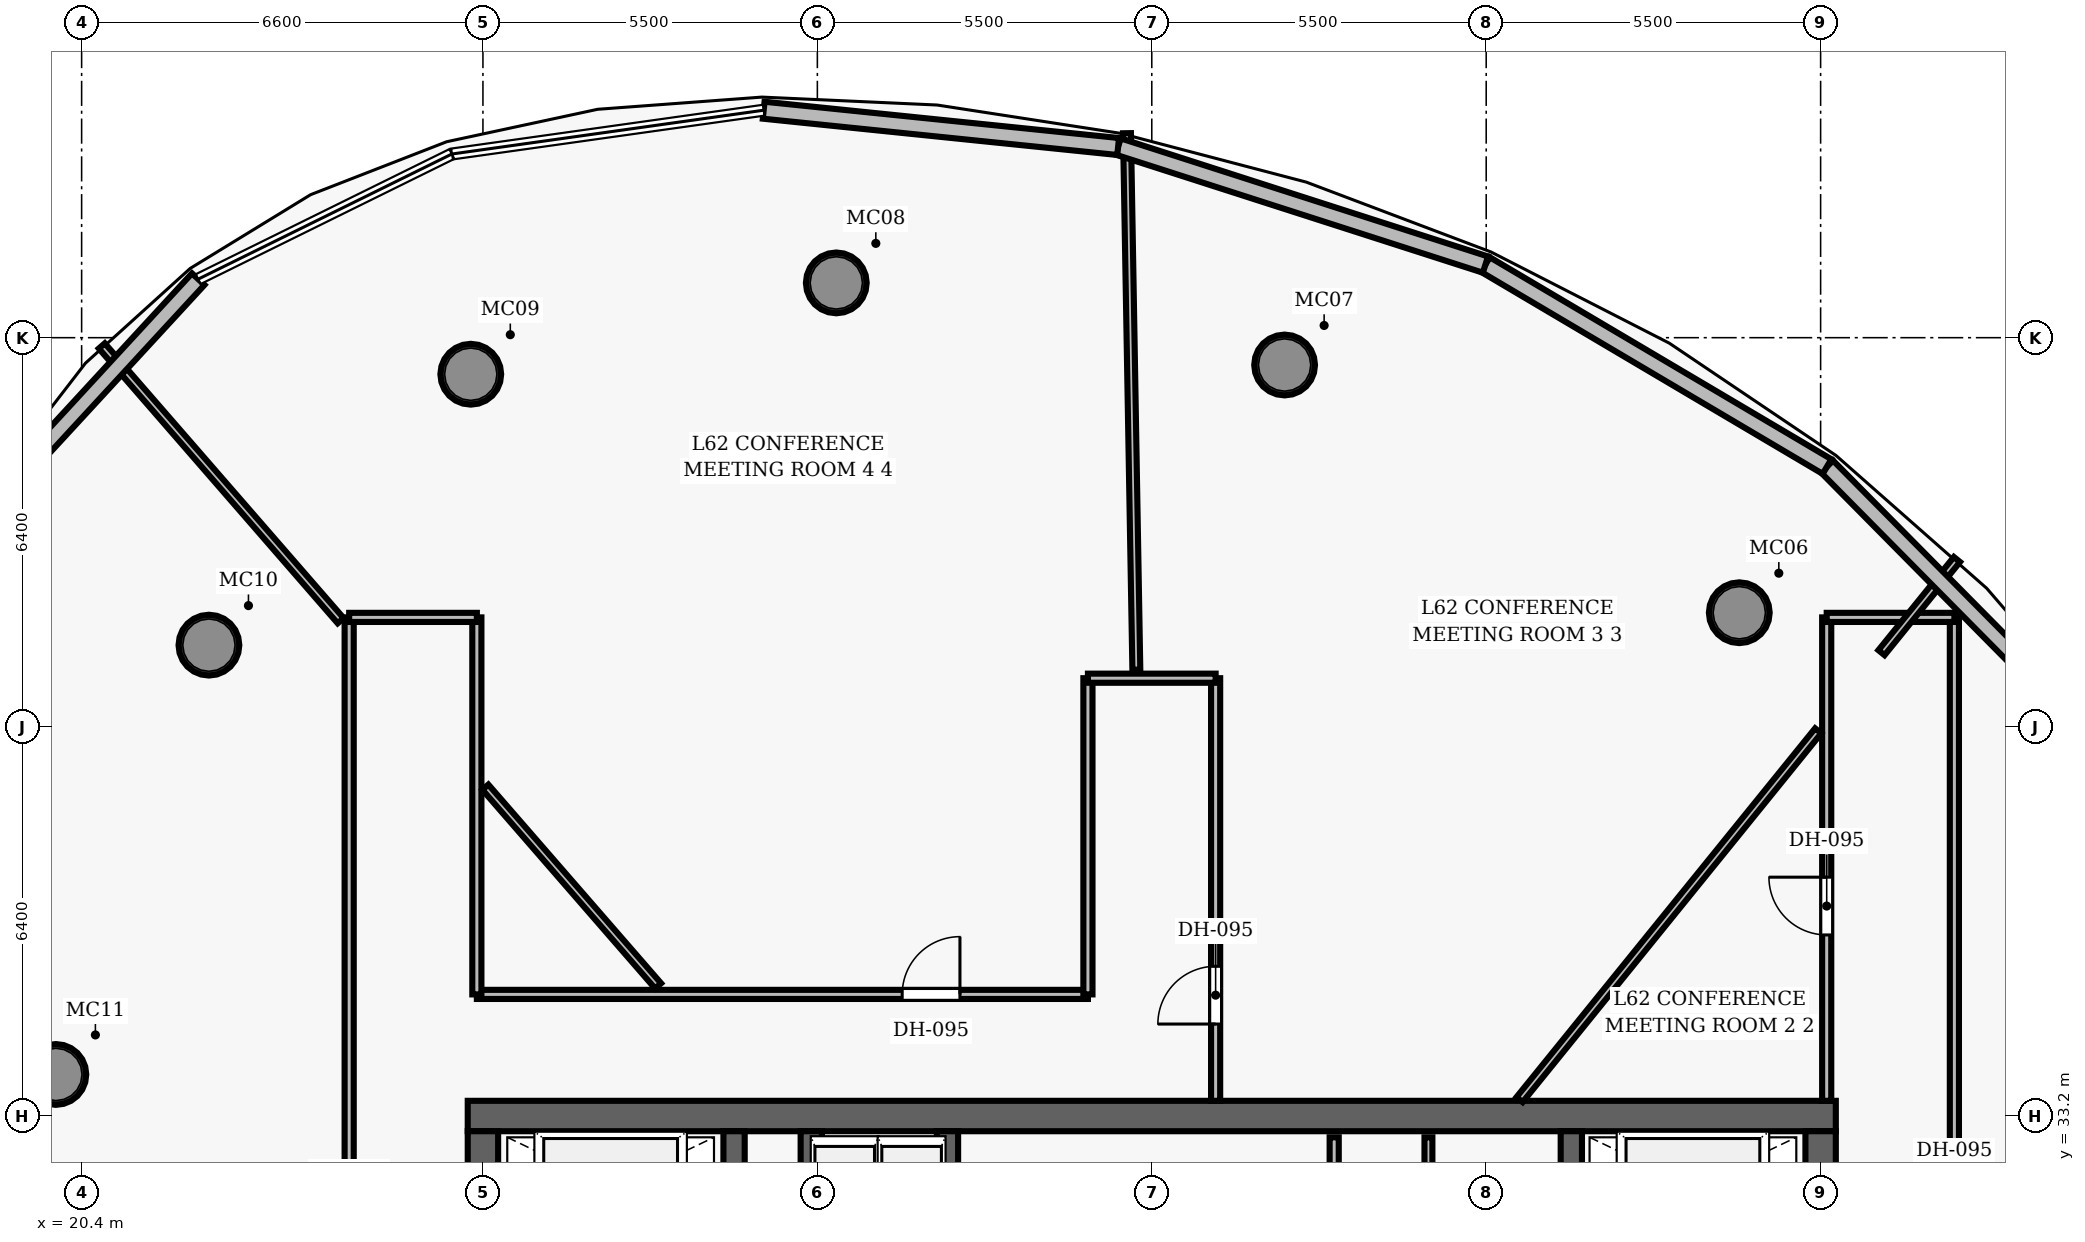
"""IFC4 building model, lengths in metres.
Left out: names, types, materials, properties, quantities, classifications, styles, units other than length and angle.
Written with IfcOpenShell. Run it as: python <this file> out.ifc"""

import sys

from ifc_helpers import new_model, si_unit, direction, frame, frame_2d, origin, origin_2d, place, context, subcontext, project, spatial, rectangle, hollow_circle, extrude, element, fill, save


model = new_model("IFC4")
c1 = context("Model", 3, precision=1e-05, world=origin(), true_north=direction((0.0, 1.0)))
c2 = subcontext(c1, "Body", "Model", "MODEL_VIEW")
j1 = project(units=[si_unit("LENGTHUNIT", "METRE"), si_unit("PLANEANGLEUNIT", "RADIAN")], contexts=[c1])
p1 = place(None, origin())
s1 = spatial("IfcSite", under=j1, at=p1, CompositionType="ELEMENT")
p2 = place(p1, origin())
s2 = spatial("IfcBuilding", under=s1, at=p2, CompositionType="ELEMENT")
p3 = place(p2, frame((0.0, 0.0, 245.9)))
s3 = spatial("IfcBuildingStorey", under=s2, at=p3, CompositionType="ELEMENT", Elevation=245.9)
p4 = place(p3, frame((26.75, 33.2, 0.0), z_axis=(0.0, 0.0, 1.0), x_axis=(1.0, 0.0, 0.0)))
e1 = element("IfcWall", 1, at=p4, inside=s3, PredefinedType="SHEAR", context=c2, shape_type="SweptSolid", body=[
    extrude(rectangle(XDim=22.5, YDim=0.5, at=frame_2d((11.25, 0.0))), origin(), (0.0, 0.0, 1.0), 3.85),
])
p5 = place(p3, frame((27.0, 19.05, 0.0), z_axis=(0.0, 0.0, 1.0), x_axis=(0.0, 1.0, 0.0)))
e2 = element("IfcWall", 2, at=p5, inside=s3, PredefinedType="SHEAR", context=c2, shape_type="SweptSolid", body=[
    extrude(rectangle(XDim=13.9, YDim=0.5, at=frame_2d((6.95, 0.0))), origin(), (0.0, 0.0, 1.0), 3.85),
])
p6 = place(p5, frame((8.2, 0.0, 0.0)))
e3 = element("IfcOpeningElement", 3, at=p6, cuts=e2, PredefinedType="OPENING", context=c2, shape_type="SweptSolid", body=[
    extrude(rectangle(XDim=1.05, YDim=2.15, at=frame_2d((0.525, 1.075))), frame((0.0, 0.26, 0.0), z_axis=(0.0, -1.0, 0.0), x_axis=(1.0, 0.0, 0.0)), (0.0, 0.0, 1.0), 0.52),
])
p7 = place(p3, frame((49.0, 19.05, 0.0), z_axis=(0.0, 0.0, 1.0), x_axis=(0.0, 1.0, 0.0)))
e4 = element("IfcWall", 4, at=p7, inside=s3, PredefinedType="SHEAR", context=c2, shape_type="SweptSolid", body=[
    extrude(rectangle(XDim=13.9, YDim=0.5, at=frame_2d((6.95, 0.0))), origin(), (0.0, 0.0, 1.0), 3.85),
])
p8 = place(p7, frame((8.2, 0.0, 0.0)))
e5 = element("IfcOpeningElement", 5, at=p8, cuts=e4, PredefinedType="OPENING", context=c2, shape_type="SweptSolid", body=[
    extrude(rectangle(XDim=1.05, YDim=2.15, at=frame_2d((0.525, 1.075))), frame((0.0, 0.26, 0.0), z_axis=(0.0, -1.0, 0.0), x_axis=(1.0, 0.0, 0.0)), (0.0, 0.0, 1.0), 0.52),
])
for number, where, z_axis, x_axis in (
    (6, (31.13, 19.05, 0.0), (0.0, 0.0, 1.0), (0.0, 1.0, 0.0)),
    (7, (44.9, 19.05, 0.0), (0.0, 0.0, 1.0), (0.0, 1.0, 0.0)),
):
    element("IfcWall", number, at=place(p3, frame(where, z_axis=z_axis, x_axis=x_axis)), inside=s3, PredefinedType="SHEAR", context=c2, shape_type="SweptSolid", body=[
        extrude(rectangle(XDim=13.9, YDim=0.35, at=frame_2d((6.95, 0.0))), origin(), (0.0, 0.0, 1.0), 3.85),
    ])
for number, where, z_axis, x_axis in (
    (8, (47.662, 41.477, 0.0), (0.0, 0.0, 1.0), (1.0, 0.0, 0.0)),
    (9, (40.185, 45.551, 0.0), (0.0, 0.0, 1.0), (1.0, 0.0, 0.0)),
    (10, (32.812, 46.901, 0.0), (0.0, 0.0, 1.0), (1.0, 0.0, 0.0)),
    (11, (26.8, 45.399, 0.0), (0.0, 0.0, 1.0), (1.0, 0.0, 0.0)),
    (12, (22.494, 40.944, 0.0), (0.0, 0.0, 1.0), (1.0, 0.0, 0.0)),
    (13, (19.976, 33.884, 0.0), (0.0, 0.0, 1.0), (1.0, 0.0, 0.0)),
):
    element("IfcColumn", number, at=place(p3, frame(where, z_axis=z_axis, x_axis=x_axis)), inside=s3, PredefinedType="COLUMN", context=c2, shape_type="SweptSolid", body=[
        extrude(hollow_circle(Radius=0.5, WallThickness=0.045, at=origin_2d()), origin(), (0.0, 0.0, 1.0), 3.85),
    ])
p9 = place(p3, frame((34.64, 26.69, 0.0), z_axis=(0.0, 0.0, 1.0), x_axis=(0.0, 1.0, 0.0)))
e14 = element("IfcWall", 14, at=p9, inside=s3, PredefinedType="SHEAR", context=c2, shape_type="SweptSolid", body=[
    extrude(rectangle(XDim=6.26, YDim=0.35, at=frame_2d((3.13, 0.0))), origin(), (0.0, 0.0, 1.0), 3.85),
])
p10 = place(p9, frame((0.85, 0.0, 0.0)))
e15 = element("IfcOpeningElement", 15, at=p10, cuts=e14, PredefinedType="OPENING", context=c2, shape_type="SweptSolid", body=[
    extrude(rectangle(XDim=1.05, YDim=2.15, at=frame_2d((0.525, 1.075))), frame((0.0, 0.185, 0.0), z_axis=(0.0, -1.0, 0.0), x_axis=(1.0, 0.0, 0.0)), (0.0, 0.0, 1.0), 0.37),
])
p11 = place(p3, frame((32.4, 30.22, 0.0), z_axis=(0.0, 0.0, 1.0), x_axis=(0.0, 1.0, 0.0)))
e16 = element("IfcWall", 16, at=p11, inside=s3, PredefinedType="SHEAR", context=c2, shape_type="SweptSolid", body=[
    extrude(rectangle(XDim=2.73, YDim=0.35, at=frame_2d((1.365, 0.0))), origin(), (0.0, 0.0, 1.0), 3.04),
])
p12 = place(p3, frame((41.0, 28.95, 0.0), z_axis=(0.0, 0.0, 1.0), x_axis=(0.0, 1.0, 0.0)))
e17 = element("IfcWall", 17, at=p12, inside=s3, PredefinedType="PARTITIONING", context=c2, shape_type="SweptSolid", body=[
    extrude(rectangle(XDim=3.9, YDim=0.15, at=frame_2d((1.95, 0.0))), origin(), (0.0, 0.0, 1.0), 3.04),
])
p13 = place(p12, frame((0.7, 0.0, 0.0)))
e18 = element("IfcOpeningElement", 18, at=p13, cuts=e17, PredefinedType="OPENING", context=c2, shape_type="SweptSolid", body=[
    extrude(rectangle(XDim=0.85, YDim=2.1, at=frame_2d((0.425, 1.05))), frame((0.0, 0.085, 0.0), z_axis=(0.0, -1.0, 0.0), x_axis=(1.0, 0.0, 0.0)), (0.0, 0.0, 1.0), 0.17),
])
p14 = place(p3, frame((42.55, 28.1, 0.0), z_axis=(0.0, 0.0, 1.0), x_axis=(0.0, 1.0, 0.0)))
e19 = element("IfcWall", 19, at=p14, inside=s3, PredefinedType="PARTITIONING", context=c2, shape_type="SweptSolid", body=[
    extrude(rectangle(XDim=4.75, YDim=0.13, at=frame_2d((2.375, 0.0))), origin(), (0.0, 0.0, 1.0), 3.04),
])
p15 = place(p14, frame((0.55, 0.0, 0.0)))
e20 = element("IfcOpeningElement", 20, at=p15, cuts=e19, PredefinedType="OPENING", context=c2, shape_type="SweptSolid", body=[
    extrude(rectangle(XDim=0.85, YDim=2.1, at=frame_2d((0.425, 1.05))), frame((0.0, 0.075, 0.0), z_axis=(0.0, -1.0, 0.0), x_axis=(1.0, 0.0, 0.0)), (0.0, 0.0, 1.0), 0.15),
])
p16 = place(p14, frame((2.9, 0.0, 0.0)))
e21 = element("IfcOpeningElement", 21, at=p16, cuts=e19, PredefinedType="OPENING", context=c2, shape_type="SweptSolid", body=[
    extrude(rectangle(XDim=0.85, YDim=2.1, at=frame_2d((0.425, 1.05))), frame((0.0, 0.075, 0.0), z_axis=(0.0, -1.0, 0.0), x_axis=(1.0, 0.0, 0.0)), (0.0, 0.0, 1.0), 0.15),
])
p17 = place(p3, frame((26.9, 35.2, 0.0), z_axis=(0.0, 0.0, 1.0), x_axis=(1.0, 0.0, 0.0)))
e22 = element("IfcWall", 22, at=p17, inside=s3, PredefinedType="PARTITIONING", context=c2, shape_type="SweptSolid", body=[
    extrude(rectangle(XDim=10.05, YDim=0.15, at=frame_2d((5.025, 0.0))), origin(), (0.0, 0.0, 1.0), 3.04),
])
p18 = place(p17, frame((6.995, 0.0, 0.0)))
e23 = element("IfcOpeningElement", 23, at=p18, cuts=e22, PredefinedType="OPENING", context=c2, shape_type="SweptSolid", body=[
    extrude(rectangle(XDim=0.95, YDim=2.15, at=frame_2d((0.475, 1.075))), frame((0.0, 0.085, 0.0), z_axis=(0.0, -1.0, 0.0), x_axis=(1.0, 0.0, 0.0)), (0.0, 0.0, 1.0), 0.17),
])
p19 = place(p3, frame((24.8, 11.29, 0.0), z_axis=(0.0, 0.0, 1.0), x_axis=(0.0, 1.0, 0.0)))
e24 = element("IfcWall", 24, at=p19, inside=s3, PredefinedType="PARTITIONING", context=c2, shape_type="SweptSolid", body=[
    extrude(rectangle(XDim=30.11, YDim=0.15, at=frame_2d((15.055, 0.0))), origin(), (0.0, 0.0, 1.0), 3.04),
])
p20 = place(p19, frame((19.445, 0.0, 0.0)))
e25 = element("IfcOpeningElement", 25, at=p20, cuts=e24, PredefinedType="OPENING", context=c2, shape_type="SweptSolid", body=[
    extrude(rectangle(XDim=0.95, YDim=2.15, at=frame_2d((0.475, 1.075))), frame((0.0, 0.085, 0.0), z_axis=(0.0, -1.0, 0.0), x_axis=(1.0, 0.0, 0.0)), (0.0, 0.0, 1.0), 0.17),
])
p21 = place(p19, frame((11.011, 0.0, 0.0)))
e26 = element("IfcOpeningElement", 26, at=p21, cuts=e24, PredefinedType="OPENING", context=c2, shape_type="SweptSolid", body=[
    extrude(rectangle(XDim=1.5, YDim=2.2, at=frame_2d((0.75, 1.1))), frame((0.0, 0.085, 0.0), z_axis=(0.0, -1.0, 0.0), x_axis=(1.0, 0.0, 0.0)), (0.0, 0.0, 1.0), 0.17),
])
p22 = place(p3, frame((26.9, 35.2, 0.0), z_axis=(0.0, 0.0, 1.0), x_axis=(0.0, 1.0, 0.0)))
e27 = element("IfcWall", 27, at=p22, inside=s3, PredefinedType="PARTITIONING", context=c2, shape_type="SweptSolid", body=[
    extrude(rectangle(XDim=6.2, YDim=0.15, at=frame_2d((3.1, 0.0))), origin(), (0.0, 0.0, 1.0), 3.04),
])
p23 = place(p3, frame((24.8, 41.4, 0.0), z_axis=(0.0, 0.0, 1.0), x_axis=(1.0, 0.0, 0.0)))
e28 = element("IfcWall", 28, at=p23, inside=s3, PredefinedType="PARTITIONING", context=c2, shape_type="SweptSolid", body=[
    extrude(rectangle(XDim=2.1, YDim=0.15, at=frame_2d((1.05, 0.0))), origin(), (0.0, 0.0, 1.0), 3.04),
])
p24 = place(p3, frame((51.2, 10.6, 0.0), z_axis=(0.0, 0.0, 1.0), x_axis=(0.0, 1.0, 0.0)))
e29 = element("IfcWall", 29, at=p24, inside=s3, PredefinedType="PARTITIONING", context=c2, shape_type="SweptSolid", body=[
    extrude(rectangle(XDim=30.8, YDim=0.15, at=frame_2d((15.4, 0.0))), origin(), (0.0, 0.0, 1.0), 3.04),
])
p25 = place(p24, frame((20.494, 0.0, 0.0)))
e30 = element("IfcOpeningElement", 30, at=p25, cuts=e29, PredefinedType="OPENING", context=c2, shape_type="SweptSolid", body=[
    extrude(rectangle(XDim=0.95, YDim=2.15, at=frame_2d((0.475, 1.075))), frame((0.0, 0.085, 0.0), z_axis=(0.0, -1.0, 0.0), x_axis=(1.0, 0.0, 0.0)), (0.0, 0.0, 1.0), 0.17),
])
p26 = place(p24, frame((10.941, 0.0, 0.0)))
e31 = element("IfcOpeningElement", 31, at=p26, cuts=e29, PredefinedType="OPENING", context=c2, shape_type="SweptSolid", body=[
    extrude(rectangle(XDim=0.95, YDim=2.15, at=frame_2d((0.475, 1.075))), frame((0.0, 0.085, 0.0), z_axis=(0.0, -1.0, 0.0), x_axis=(1.0, 0.0, 0.0)), (0.0, 0.0, 1.0), 0.17),
])
p27 = place(p3, frame((49.1, 33.45, 0.0), z_axis=(0.0, 0.0, 1.0), x_axis=(0.0, 1.0, 0.0)))
e32 = element("IfcWall", 32, at=p27, inside=s3, PredefinedType="PARTITIONING", context=c2, shape_type="SweptSolid", body=[
    extrude(rectangle(XDim=7.95, YDim=0.15, at=frame_2d((3.975, 0.0))), origin(), (0.0, 0.0, 1.0), 3.04),
])
p28 = place(p27, frame((2.728, 0.0, 0.0)))
e33 = element("IfcOpeningElement", 33, at=p28, cuts=e32, PredefinedType="OPENING", context=c2, shape_type="SweptSolid", body=[
    extrude(rectangle(XDim=0.95, YDim=2.15, at=frame_2d((0.475, 1.075))), frame((0.0, 0.085, 0.0), z_axis=(0.0, -1.0, 0.0), x_axis=(1.0, 0.0, 0.0)), (0.0, 0.0, 1.0), 0.17),
])
p29 = place(p3, frame((49.1, 41.4, 0.0), z_axis=(0.0, 0.0, 1.0), x_axis=(1.0, 0.0, 0.0)))
e34 = element("IfcWall", 34, at=p29, inside=s3, PredefinedType="PARTITIONING", context=c2, shape_type="SweptSolid", body=[
    extrude(rectangle(XDim=2.1, YDim=0.15, at=frame_2d((1.05, 0.0))), origin(), (0.0, 0.0, 1.0), 3.04),
])
p30 = place(p3, frame((36.95, 35.2, 0.0), z_axis=(0.0, 0.0, 1.0), x_axis=(0.0, 1.0, 0.0)))
e35 = element("IfcWall", 35, at=p30, inside=s3, PredefinedType="PARTITIONING", context=c2, shape_type="SweptSolid", body=[
    extrude(rectangle(XDim=5.2, YDim=0.15, at=frame_2d((2.6, 0.0))), origin(), (0.0, 0.0, 1.0), 3.04),
])
p31 = place(p3, frame((39.05, 33.45, 0.0), z_axis=(0.0, 0.0, 1.0), x_axis=(0.0, 1.0, 0.0)))
e36 = element("IfcWall", 36, at=p31, inside=s3, PredefinedType="PARTITIONING", context=c2, shape_type="SweptSolid", body=[
    extrude(rectangle(XDim=6.95, YDim=0.15, at=frame_2d((3.475, 0.0))), origin(), (0.0, 0.0, 1.0), 3.04),
])
p32 = place(p31, frame((1.262, 0.0, 0.0)))
e37 = element("IfcOpeningElement", 37, at=p32, cuts=e36, PredefinedType="OPENING", context=c2, shape_type="SweptSolid", body=[
    extrude(rectangle(XDim=0.95, YDim=2.15, at=frame_2d((0.475, 1.075))), frame((0.0, 0.085, 0.0), z_axis=(0.0, -1.0, 0.0), x_axis=(1.0, 0.0, 0.0)), (0.0, 0.0, 1.0), 0.17),
])
p33 = place(p3, frame((36.95, 40.4, 0.0), z_axis=(0.0, 0.0, 1.0), x_axis=(1.0, 0.0, 0.0)))
e38 = element("IfcWall", 38, at=p33, inside=s3, PredefinedType="PARTITIONING", context=c2, shape_type="SweptSolid", body=[
    extrude(rectangle(XDim=2.1, YDim=0.15, at=frame_2d((1.05, 0.0))), origin(), (0.0, 0.0, 1.0), 3.04),
])
p34 = place(p3, frame((44.049, 33.47, 0.0), z_axis=(0.0, 0.0, 1.0), x_axis=(0.629319722443, 0.777146502883, 0.0)))
e39 = element("IfcWall", 39, at=p34, inside=s3, PredefinedType="PARTITIONING", context=c2, shape_type="SweptSolid", body=[
    extrude(rectangle(XDim=7.803, YDim=0.13, at=frame_2d((3.902, 0.0))), origin(), (0.0, 0.0, 1.0), 3.04),
])
p35 = place(p3, frame((50.001, 40.82, 0.0), z_axis=(0.0, 0.0, 1.0), x_axis=(0.629258768447, 0.777195858412, 0.0)))
e40 = element("IfcWall", 40, at=p35, inside=s3, PredefinedType="PARTITIONING", context=c2, shape_type="SweptSolid", body=[
    extrude(rectangle(XDim=1.972, YDim=0.13, at=frame_2d((0.986, 0.0))), origin(), (0.0, 0.0, 1.0), 3.04),
])
p36 = place(p3, frame((37.746, 40.54, 0.0), z_axis=(0.0, 0.0, 1.0), x_axis=(-0.017430524335, 0.99984807687, 0.0)))
e41 = element("IfcWall", 41, at=p36, inside=s3, PredefinedType="PARTITIONING", context=c2, shape_type="SweptSolid", body=[
    extrude(rectangle(XDim=8.824, YDim=0.13, at=frame_2d((4.412, 0.0))), origin(), (0.0, 0.0, 1.0), 3.04),
])
p37 = place(p3, frame((29.881, 35.34, 0.0), z_axis=(0.0, 0.0, 1.0), x_axis=(-0.656078202057, 0.754692912903, 0.0)))
e42 = element("IfcWall", 42, at=p37, inside=s3, PredefinedType="PARTITIONING", context=c2, shape_type="SweptSolid", body=[
    extrude(rectangle(XDim=4.33, YDim=0.13, at=frame_2d((2.165, 0.0))), origin(), (0.0, 0.0, 1.0), 3.04),
])
p38 = place(p3, frame((24.66, 41.346, 0.0), z_axis=(0.0, 0.0, 1.0), x_axis=(-0.656044437945, 0.754722263778, 0.0)))
e43 = element("IfcWall", 43, at=p38, inside=s3, PredefinedType="PARTITIONING", context=c2, shape_type="SweptSolid", body=[
    extrude(rectangle(XDim=5.987, YDim=0.13, at=frame_2d((2.994, 0.0))), origin(), (0.0, 0.0, 1.0), 3.04),
])
p39 = place(p3, frame((49.105, 43.881, 0.0), z_axis=(0.0, 0.0, 1.0), x_axis=(0.703149483936, -0.711042054481, 0.0)))
e44 = element("IfcWall", 44, at=p39, inside=s3, PredefinedType="SOLIDWALL", context=c2, shape_type="SweptSolid", body=[
    extrude(rectangle(XDim=6.527, YDim=0.28, at=frame_2d((3.263, 0.0))), origin(), (0.0, 0.0, 1.0), 3.625),
])
p40 = place(p3, frame((43.488, 47.202, 0.0), z_axis=(0.0, 0.0, 1.0), x_axis=(0.86081852112, -0.508912049077, 0.0)))
e45 = element("IfcWall", 45, at=p40, inside=s3, PredefinedType="SOLIDWALL", context=c2, shape_type="SweptSolid", body=[
    extrude(rectangle(XDim=6.526, YDim=0.28, at=frame_2d((3.263, 0.0))), origin(), (0.0, 0.0, 1.0), 3.625),
])
p41 = place(p3, frame((37.447, 49.144, 0.0), z_axis=(0.0, 0.0, 1.0), x_axis=(0.952018552496, -0.306040317122, 0.0)))
e46 = element("IfcWall", 46, at=p41, inside=s3, PredefinedType="SOLIDWALL", context=c2, shape_type="SweptSolid", body=[
    extrude(rectangle(XDim=6.345, YDim=0.28, at=frame_2d((3.173, 0.0))), origin(), (0.0, 0.0, 1.0), 3.625),
])
p42 = place(p3, frame((31.617, 49.741, 0.0), z_axis=(0.0, 0.0, 1.0), x_axis=(0.994802668122, -0.101821665168, 0.0)))
e47 = element("IfcWall", 47, at=p42, inside=s3, PredefinedType="SOLIDWALL", context=c2, shape_type="SweptSolid", body=[
    extrude(rectangle(XDim=5.86, YDim=0.28, at=frame_2d((2.93, 0.0))), origin(), (0.0, 0.0, 1.0), 3.625),
])
p43 = place(p3, frame((19.167, 43.543, 0.0), z_axis=(0.0, 0.0, 1.0), x_axis=(0.677562449633, 0.735465245166, 0.0)))
e48 = element("IfcWall", 48, at=p43, inside=s3, PredefinedType="SOLIDWALL", context=c2, shape_type="SweptSolid", body=[
    extrude(rectangle(XDim=4.651, YDim=0.28, at=frame_2d((2.325, 0.0))), origin(), (0.0, 0.0, 1.0), 3.625),
])
p44 = place(p28, origin())
e49 = element("IfcDoor", 49, at=p44, inside=s3, OperationType="SINGLE_SWING_RIGHT", PredefinedType="DOOR", context=c2, shape_type="SweptSolid", body=[
    extrude(rectangle(XDim=0.95, YDim=2.15, at=frame_2d((0.475, 1.075))), frame((0.0, 0.025, 0.0), z_axis=(0.0, -1.0, 0.0), x_axis=(1.0, 0.0, 0.0)), (0.0, 0.0, 1.0), 0.05),
])
fill(e33, e49)
p45 = place(p32, origin())
e50 = element("IfcDoor", 50, at=p45, inside=s3, OperationType="SINGLE_SWING_LEFT", PredefinedType="DOOR", context=c2, shape_type="SweptSolid", body=[
    extrude(rectangle(XDim=0.95, YDim=2.15, at=frame_2d((0.475, 1.075))), frame((0.0, 0.025, 0.0), z_axis=(0.0, -1.0, 0.0), x_axis=(1.0, 0.0, 0.0)), (0.0, 0.0, 1.0), 0.05),
])
fill(e37, e50)
p46 = place(p18, origin())
e51 = element("IfcDoor", 51, at=p46, inside=s3, OperationType="SINGLE_SWING_RIGHT", PredefinedType="DOOR", context=c2, shape_type="SweptSolid", body=[
    extrude(rectangle(XDim=0.95, YDim=2.15, at=frame_2d((0.475, 1.075))), frame((0.0, 0.025, 0.0), z_axis=(0.0, -1.0, 0.0), x_axis=(1.0, 0.0, 0.0)), (0.0, 0.0, 1.0), 0.05),
])
fill(e23, e51)
save(model, sys.argv[1])
